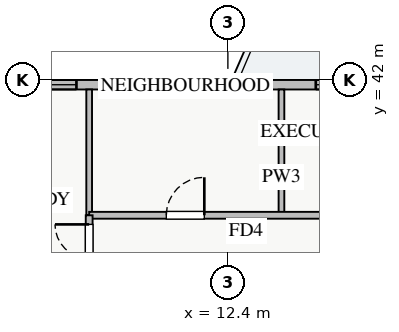
"""IFC4 building model, lengths in metres.
Left out: names, types, materials, properties, quantities, classifications, styles, units other than length and angle.
Written with IfcOpenShell. Run it as: python <this file> out.ifc"""

import sys

from ifc_helpers import new_model, si_unit, direction, frame, frame_2d, origin, place, context, subcontext, project, spatial, rectangle, extrude, source, transform, mapped, element, fill, save


model = new_model("IFC4")
c1 = context("Model", 3, precision=1e-05, world=origin(), true_north=direction((0.0, 1.0)))
c2 = subcontext(c1, "Body", "Model", "MODEL_VIEW")
j1 = project(units=[si_unit("LENGTHUNIT", "METRE"), si_unit("PLANEANGLEUNIT", "RADIAN")], contexts=[c1])
p1 = place(None, origin())
s1 = spatial("IfcSite", under=j1, at=p1, CompositionType="ELEMENT")
p2 = place(p1, origin())
s2 = spatial("IfcBuilding", under=s1, at=p2, CompositionType="ELEMENT")
p3 = place(p2, frame((0.0, 0.0, 66.5)))
s3 = spatial("IfcBuildingStorey", under=s2, at=p3, CompositionType="ELEMENT", Elevation=66.5)
p4 = place(p3, frame((5.45, 41.875, 0.0), z_axis=(0.0, 0.0, 1.0), x_axis=(1.0, 0.0, 0.0)))
e1 = element("IfcWall", 1, at=p4, inside=s3, PredefinedType="STANDARD", context=c2, shape_type="SweptSolid", body=[
    extrude(rectangle(XDim=27.1, YDim=0.25, at=frame_2d((13.55, 0.0))), origin(), (0.0, 0.0, 1.0), 2.61),
])
p5 = place(p4, frame((14.4, 0.0, 0.0)))
e2 = element("IfcOpeningElement", 2, at=p5, cuts=e1, PredefinedType="OPENING", context=c2, shape_type="SweptSolid", body=[
    extrude(rectangle(XDim=1.2, YDim=2.1, at=frame_2d((0.6, 1.05))), frame((0.0, 0.135, 0.0), z_axis=(0.0, -1.0, 0.0), x_axis=(1.0, 0.0, 0.0)), (0.0, 0.0, 1.0), 0.27),
])
p6 = place(p4, frame((1.465, 0.0, 0.9)))
e3 = element("IfcOpeningElement", 3, at=p6, cuts=e1, PredefinedType="OPENING", context=c2, shape_type="SweptSolid", body=[
    extrude(rectangle(XDim=1.5, YDim=1.5, at=frame_2d((0.75, 0.75))), frame((0.0, 0.135, 0.0), z_axis=(0.0, -1.0, 0.0), x_axis=(1.0, 0.0, 0.0)), (0.0, 0.0, 1.0), 0.27),
])
p7 = place(p4, frame((9.263, 0.0, 0.9)))
e4 = element("IfcOpeningElement", 4, at=p7, cuts=e1, PredefinedType="OPENING", context=c2, shape_type="SweptSolid", body=[
    extrude(rectangle(XDim=1.8, YDim=1.45, at=frame_2d((0.9, 0.725))), frame((0.0, 0.135, 0.0), z_axis=(0.0, -1.0, 0.0), x_axis=(1.0, 0.0, 0.0)), (0.0, 0.0, 1.0), 0.27),
])
p8 = place(p4, frame((17.93, 0.0, 0.9)))
e5 = element("IfcOpeningElement", 5, at=p8, cuts=e1, PredefinedType="OPENING", context=c2, shape_type="SweptSolid", body=[
    extrude(rectangle(XDim=1.5, YDim=1.5, at=frame_2d((0.75, 0.75))), frame((0.0, 0.135, 0.0), z_axis=(0.0, -1.0, 0.0), x_axis=(1.0, 0.0, 0.0)), (0.0, 0.0, 1.0), 0.27),
])
p9 = place(p4, frame((22.663, 0.0, 0.9)))
e6 = element("IfcOpeningElement", 6, at=p9, cuts=e1, PredefinedType="OPENING", context=c2, shape_type="SweptSolid", body=[
    extrude(rectangle(XDim=2.1, YDim=1.48, at=frame_2d((1.05, 0.74))), frame((0.0, 0.135, 0.0), z_axis=(0.0, -1.0, 0.0), x_axis=(1.0, 0.0, 0.0)), (0.0, 0.0, 1.0), 0.27),
])
p10 = place(p4, frame((4.63, 0.0, 0.9)))
e7 = element("IfcOpeningElement", 7, at=p10, cuts=e1, PredefinedType="OPENING", context=c2, shape_type="SweptSolid", body=[
    extrude(rectangle(XDim=2.4, YDim=1.5, at=frame_2d((1.2, 0.75))), frame((0.0, 0.135, 0.0), z_axis=(0.0, -1.0, 0.0), x_axis=(1.0, 0.0, 0.0)), (0.0, 0.0, 1.0), 0.27),
])
for number, where, z_axis, x_axis in (
    (8, (13.81, 38.44, 0.0), (0.0, 0.0, 1.0), (0.0, 1.0, 0.0)),
    (9, (8.75, 38.44, 0.0), (0.0, 0.0, 1.0), (0.0, 1.0, 0.0)),
):
    element("IfcWall", number, at=place(p3, frame(where, z_axis=z_axis, x_axis=x_axis)), inside=s3, PredefinedType="PARTITIONING", context=c2, shape_type="SweptSolid", body=[
        extrude(rectangle(XDim=3.31, YDim=0.15, at=frame_2d((1.655, 0.0))), origin(), (0.0, 0.0, 1.0), 3.07),
    ])
p11 = place(p3, frame((8.75, 38.44, 0.0), z_axis=(0.0, 0.0, 1.0), x_axis=(1.0, 0.0, 0.0)))
e10 = element("IfcWall", 10, at=p11, inside=s3, PredefinedType="PARTITIONING", context=c2, shape_type="SweptSolid", body=[
    extrude(rectangle(XDim=23.61, YDim=0.18, at=frame_2d((11.805, 0.0))), origin(), (0.0, 0.0, 1.0), 3.07),
])
p12 = place(p11, frame((2.03, 0.0, 0.0)))
e11 = element("IfcOpeningElement", 11, at=p12, cuts=e10, PredefinedType="OPENING", context=c2, shape_type="SweptSolid", body=[
    extrude(rectangle(XDim=1.0, YDim=2.05, at=frame_2d((0.5, 1.025))), frame((0.0, 0.1, 0.0), z_axis=(0.0, -1.0, 0.0), x_axis=(1.0, 0.0, 0.0)), (0.0, 0.0, 1.0), 0.2),
])
p13 = place(p11, frame((8.555, 0.0, 0.0)))
e12 = element("IfcOpeningElement", 12, at=p13, cuts=e10, PredefinedType="OPENING", context=c2, shape_type="SweptSolid", body=[
    extrude(rectangle(XDim=1.0, YDim=2.05, at=frame_2d((0.5, 1.025))), frame((0.0, 0.1, 0.0), z_axis=(0.0, -1.0, 0.0), x_axis=(1.0, 0.0, 0.0)), (0.0, 0.0, 1.0), 0.2),
])
p14 = place(p11, frame((14.88, 0.0, 0.0)))
e13 = element("IfcOpeningElement", 13, at=p14, cuts=e10, PredefinedType="OPENING", context=c2, shape_type="SweptSolid", body=[
    extrude(rectangle(XDim=1.0, YDim=2.05, at=frame_2d((0.5, 1.025))), frame((0.0, 0.1, 0.0), z_axis=(0.0, -1.0, 0.0), x_axis=(1.0, 0.0, 0.0)), (0.0, 0.0, 1.0), 0.2),
])
p15 = place(p11, frame((20.16, 0.0, 0.0)))
e14 = element("IfcOpeningElement", 14, at=p15, cuts=e10, PredefinedType="OPENING", context=c2, shape_type="SweptSolid", body=[
    extrude(rectangle(XDim=1.0, YDim=2.05, at=frame_2d((0.5, 1.025))), frame((0.0, 0.1, 0.0), z_axis=(0.0, -1.0, 0.0), x_axis=(1.0, 0.0, 0.0)), (0.0, 0.0, 1.0), 0.2),
])
p16 = place(p3, frame((8.75, 7.21, 0.0), z_axis=(0.0, 0.0, 1.0), x_axis=(0.0, 1.0, 0.0)))
e15 = element("IfcWall", 15, at=p16, inside=s3, PredefinedType="PARTITIONING", context=c2, shape_type="SweptSolid", body=[
    extrude(rectangle(XDim=31.23, YDim=0.18, at=frame_2d((15.615, 0.0))), origin(), (0.0, 0.0, 1.0), 3.07),
])
p17 = place(p16, frame((30.09, 0.0, 0.0)))
e16 = element("IfcOpeningElement", 16, at=p17, cuts=e15, PredefinedType="OPENING", context=c2, shape_type="SweptSolid", body=[
    extrude(rectangle(XDim=0.9, YDim=2.05, at=frame_2d((0.45, 1.025))), frame((0.0, 0.1, 0.0), z_axis=(0.0, -1.0, 0.0), x_axis=(1.0, 0.0, 0.0)), (0.0, 0.0, 1.0), 0.2),
])
p18 = place(p16, frame((0.24, 0.0, 0.0)))
e17 = element("IfcOpeningElement", 17, at=p18, cuts=e15, PredefinedType="OPENING", context=c2, shape_type="SweptSolid", body=[
    extrude(rectangle(XDim=0.9, YDim=2.05, at=frame_2d((0.45, 1.025))), frame((0.0, 0.1, 0.0), z_axis=(0.0, -1.0, 0.0), x_axis=(1.0, 0.0, 0.0)), (0.0, 0.0, 1.0), 0.2),
])
p19 = place(p16, frame((2.555, 0.0, 0.0)))
e18 = element("IfcOpeningElement", 18, at=p19, cuts=e15, PredefinedType="OPENING", context=c2, shape_type="SweptSolid", body=[
    extrude(rectangle(XDim=1.0, YDim=2.05, at=frame_2d((0.5, 1.025))), frame((0.0, 0.1, 0.0), z_axis=(0.0, -1.0, 0.0), x_axis=(1.0, 0.0, 0.0)), (0.0, 0.0, 1.0), 0.2),
])
p20 = place(p16, frame((11.91, 0.0, 0.0)))
e19 = element("IfcOpeningElement", 19, at=p20, cuts=e15, PredefinedType="OPENING", context=c2, shape_type="SweptSolid", body=[
    extrude(rectangle(XDim=1.0, YDim=2.05, at=frame_2d((0.5, 1.025))), frame((0.0, 0.1, 0.0), z_axis=(0.0, -1.0, 0.0), x_axis=(1.0, 0.0, 0.0)), (0.0, 0.0, 1.0), 0.2),
])
p21 = place(p16, frame((17.425, 0.0, 0.0)))
e20 = element("IfcOpeningElement", 20, at=p21, cuts=e15, PredefinedType="OPENING", context=c2, shape_type="SweptSolid", body=[
    extrude(rectangle(XDim=1.0, YDim=2.05, at=frame_2d((0.5, 1.025))), frame((0.0, 0.1, 0.0), z_axis=(0.0, -1.0, 0.0), x_axis=(1.0, 0.0, 0.0)), (0.0, 0.0, 1.0), 0.2),
])
p22 = place(p16, frame((23.76, 0.0, 0.0)))
e21 = element("IfcOpeningElement", 21, at=p22, cuts=e15, PredefinedType="OPENING", context=c2, shape_type="SweptSolid", body=[
    extrude(rectangle(XDim=1.0, YDim=2.05, at=frame_2d((0.5, 1.025))), frame((0.0, 0.1, 0.0), z_axis=(0.0, -1.0, 0.0), x_axis=(1.0, 0.0, 0.0)), (0.0, 0.0, 1.0), 0.2),
])
m1 = source(origin(), c2, "Body", "SweptSolid", [
    extrude(rectangle(XDim=1.5, YDim=1.5, at=frame_2d((0.75, 0.75))), frame((0.0, 0.03, 0.0), z_axis=(0.0, -1.0, 0.0), x_axis=(1.0, 0.0, 0.0)), (0.0, 0.0, 1.0), 0.06),
])
p23 = place(p6, origin())
e22 = element("IfcWindow", 22, at=p23, inside=s3, PartitioningType="TRIPLE_PANEL_VERTICAL", PredefinedType="WINDOW", context=c2, shape_type="MappedRepresentation", body=[
    mapped(m1, transform((0.0, 0.0, 0.0), x_axis=(1.0, 0.0, 0.0), y_axis=(0.0, 1.0, 0.0), z_axis=(0.0, 0.0, 1.0), scale=1.0)),
])
fill(e3, e22)
m2 = source(origin(), c2, "Body", "SweptSolid", [
    extrude(rectangle(XDim=1.8, YDim=1.45, at=frame_2d((0.9, 0.725))), frame((0.0, 0.03, 0.0), z_axis=(0.0, -1.0, 0.0), x_axis=(1.0, 0.0, 0.0)), (0.0, 0.0, 1.0), 0.06),
])
p24 = place(p7, origin())
e23 = element("IfcWindow", 23, at=p24, inside=s3, PartitioningType="DOUBLE_PANEL_VERTICAL", PredefinedType="WINDOW", context=c2, shape_type="MappedRepresentation", body=[
    mapped(m2, transform((0.0, 0.0, 0.0), x_axis=(1.0, 0.0, 0.0), y_axis=(0.0, 1.0, 0.0), z_axis=(0.0, 0.0, 1.0), scale=1.0)),
])
fill(e4, e23)
m3 = source(origin(), c2, "Body", "SweptSolid", [
    extrude(rectangle(XDim=1.0, YDim=2.05, at=frame_2d((0.5, 1.025))), frame((0.0, 0.025, 0.0), z_axis=(0.0, -1.0, 0.0), x_axis=(1.0, 0.0, 0.0)), (0.0, 0.0, 1.0), 0.05),
])
p25 = place(p12, origin())
e24 = element("IfcDoor", 24, at=p25, inside=s3, OperationType="SINGLE_SWING_RIGHT", PredefinedType="DOOR", context=c2, shape_type="MappedRepresentation", body=[
    mapped(m3, transform((0.0, 0.0, 0.0), x_axis=(1.0, 0.0, 0.0), y_axis=(0.0, 1.0, 0.0), z_axis=(0.0, 0.0, 1.0), scale=1.0)),
])
fill(e11, e24)
m4 = source(origin(), c2, "Body", "SweptSolid", [
    extrude(rectangle(XDim=0.9, YDim=2.05, at=frame_2d((0.45, 1.025))), frame((0.0, 0.025, 0.0), z_axis=(0.0, -1.0, 0.0), x_axis=(1.0, 0.0, 0.0)), (0.0, 0.0, 1.0), 0.05),
])
p26 = place(p17, origin())
e25 = element("IfcDoor", 25, at=p26, inside=s3, OperationType="SINGLE_SWING_RIGHT", PredefinedType="DOOR", context=c2, shape_type="MappedRepresentation", body=[
    mapped(m4, transform((0.0, 0.0, 0.0), x_axis=(1.0, 0.0, 0.0), y_axis=(0.0, 1.0, 0.0), z_axis=(0.0, 0.0, 1.0), scale=1.0)),
])
fill(e16, e25)
m5 = source(origin(), c2, "Body", "SweptSolid", [
    extrude(rectangle(XDim=2.4, YDim=1.5, at=frame_2d((1.2, 0.75))), frame((0.0, 0.03, 0.0), z_axis=(0.0, -1.0, 0.0), x_axis=(1.0, 0.0, 0.0)), (0.0, 0.0, 1.0), 0.06),
])
p27 = place(p10, origin())
e26 = element("IfcWindow", 26, at=p27, inside=s3, PartitioningType="TRIPLE_PANEL_VERTICAL", PredefinedType="WINDOW", context=c2, shape_type="MappedRepresentation", body=[
    mapped(m5, transform((0.0, 0.0, 0.0), x_axis=(1.0, 0.0, 0.0), y_axis=(0.0, 1.0, 0.0), z_axis=(0.0, 0.0, 1.0), scale=1.0)),
])
fill(e7, e26)
save(model, sys.argv[1])
